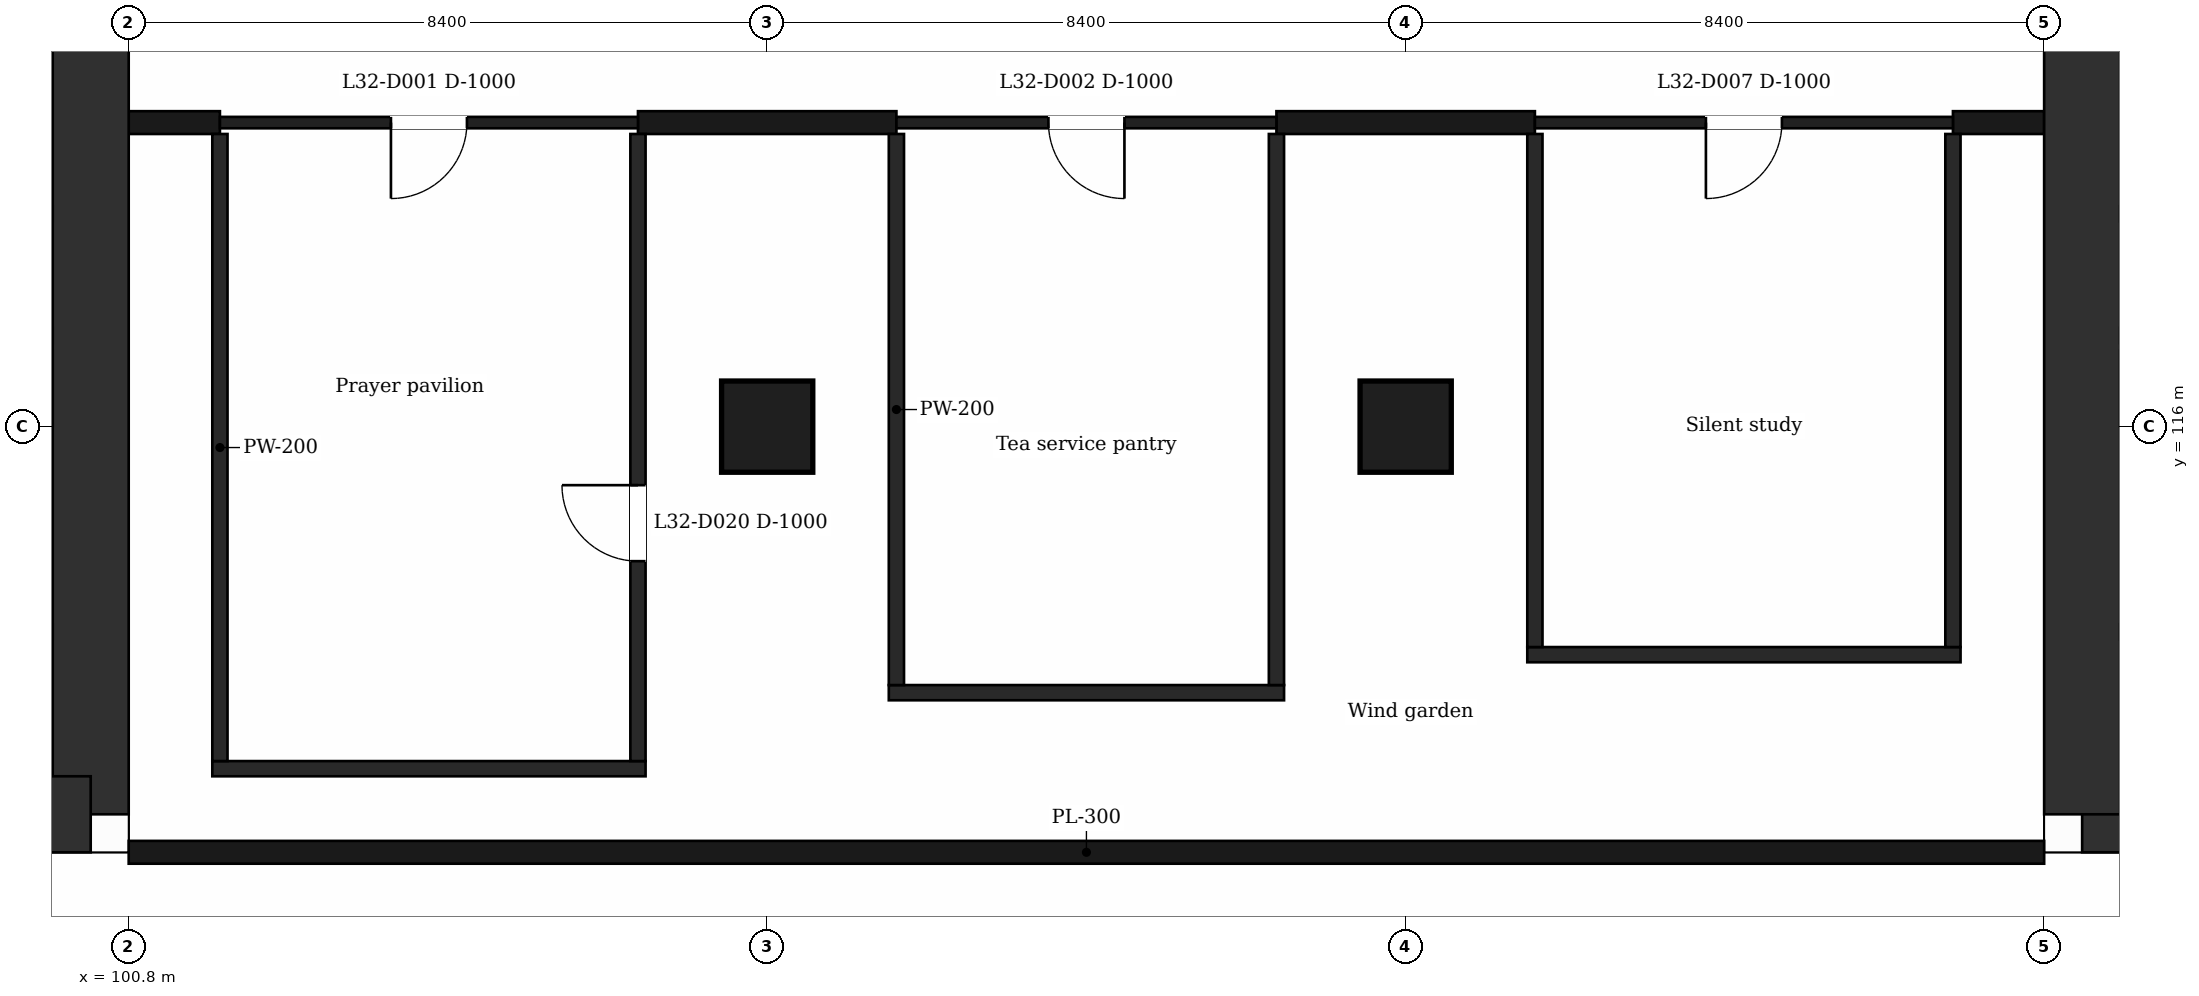
"""IFC4 building model, lengths in metres.
Left out: names, types, materials, properties, quantities, classifications, styles, units other than length and angle.
Written with IfcOpenShell. Run it as: python <this file> out.ifc"""

import sys

from ifc_helpers import new_model, si_unit, direction, frame, frame_2d, origin, origin_2d, place, context, subcontext, project, spatial, rectangle, extrude, element, fill, save


model = new_model("IFC4")
c1 = context("Model", 3, precision=1e-05, world=origin(), true_north=direction((0.0, 1.0)))
c2 = subcontext(c1, "Body", "Model", "MODEL_VIEW")
j1 = project(units=[si_unit("LENGTHUNIT", "METRE"), si_unit("PLANEANGLEUNIT", "RADIAN")], contexts=[c1])
p1 = place(None, origin())
s1 = spatial("IfcSite", under=j1, at=p1, CompositionType="ELEMENT")
p2 = place(p1, origin())
s2 = spatial("IfcBuilding", under=s1, at=p2, CompositionType="ELEMENT")
p3 = place(p2, frame((0.0, 0.0, 135.4)))
s3 = spatial("IfcBuildingStorey", under=s2, at=p3, CompositionType="ELEMENT", Elevation=135.4)
p4 = place(p3, frame((100.3, 131.9, 0.0), z_axis=(0.0, 0.0, 1.0), x_axis=(0.0, -1.0, 0.0)))
e1 = element("IfcWall", 1, at=p4, inside=s3, PredefinedType="SHEAR", context=c2, shape_type="SweptSolid", body=[
    extrude(rectangle(XDim=21.0, YDim=1.0, at=frame_2d((10.5, 0.0))), origin(), (0.0, 0.0, 1.0), 7.4),
])
p5 = place(p4, frame((7.75, 0.0, 0.0)))
e2 = element("IfcOpeningElement", 2, at=p5, cuts=e1, PredefinedType="OPENING", context=c2, shape_type="SweptSolid", body=[
    extrude(rectangle(XDim=1.4, YDim=2.1, at=frame_2d((0.7, 1.05))), frame((0.0, 0.51, 0.0), z_axis=(0.0, -1.0, 0.0), x_axis=(1.0, 0.0, 0.0)), (0.0, 0.0, 1.0), 1.02),
])
p6 = place(p3, frame((100.3, 110.9, 0.0), z_axis=(0.0, 0.0, 1.0), x_axis=(-1.0, 0.0, 0.0)))
e3 = element("IfcWall", 3, at=p6, inside=s3, PredefinedType="SHEAR", context=c2, shape_type="SweptSolid", body=[
    extrude(rectangle(XDim=14.059, YDim=1.0, at=frame_2d((7.03, 0.0))), origin(), (0.0, 0.0, 1.0), 7.4),
])
p7 = place(p6, frame((5.802, 0.0, 0.0)))
e4 = element("IfcOpeningElement", 4, at=p7, cuts=e3, PredefinedType="OPENING", context=c2, shape_type="SweptSolid", body=[
    extrude(rectangle(XDim=1.4, YDim=2.1, at=frame_2d((0.7, 1.05))), frame((0.0, 0.51, 0.0), z_axis=(0.0, -1.0, 0.0), x_axis=(1.0, 0.0, 0.0)), (0.0, 0.0, 1.0), 1.02),
])
p8 = place(p3, frame((94.9, 116.5, 0.0), z_axis=(0.0, 0.0, 1.0), x_axis=(1.0, 0.0, 0.0)))
e5 = element("IfcWall", 5, at=p8, inside=s3, PredefinedType="SHEAR", context=c2, shape_type="SweptSolid", body=[
    extrude(rectangle(XDim=4.9, YDim=1.0, at=frame_2d((2.45, 0.0))), origin(), (0.0, 0.0, 1.0), 7.4),
])
p9 = place(p3, frame((140.559, 110.9, 0.0), z_axis=(0.0, 0.0, 1.0), x_axis=(-1.0, 0.0, 0.0)))
e6 = element("IfcWall", 6, at=p9, inside=s3, PredefinedType="SHEAR", context=c2, shape_type="SweptSolid", body=[
    extrude(rectangle(XDim=14.059, YDim=1.0, at=frame_2d((7.029, 0.0))), origin(), (0.0, 0.0, 1.0), 7.4),
])
p10 = place(p9, frame((6.858, 0.0, 0.0)))
e7 = element("IfcOpeningElement", 7, at=p10, cuts=e6, PredefinedType="OPENING", context=c2, shape_type="SweptSolid", body=[
    extrude(rectangle(XDim=1.4, YDim=2.1, at=frame_2d((0.7, 1.05))), frame((0.0, 0.51, 0.0), z_axis=(0.0, -1.0, 0.0), x_axis=(1.0, 0.0, 0.0)), (0.0, 0.0, 1.0), 1.02),
])
p11 = place(p3, frame((126.5, 110.9, 0.0), z_axis=(0.0, 0.0, 1.0), x_axis=(0.0, 1.0, 0.0)))
e8 = element("IfcWall", 8, at=p11, inside=s3, PredefinedType="SHEAR", context=c2, shape_type="SweptSolid", body=[
    extrude(rectangle(XDim=21.0, YDim=1.0, at=frame_2d((10.5, 0.0))), origin(), (0.0, 0.0, 1.0), 7.4),
])
p12 = place(p11, frame((11.85, 0.0, 0.0)))
e9 = element("IfcOpeningElement", 9, at=p12, cuts=e8, PredefinedType="OPENING", context=c2, shape_type="SweptSolid", body=[
    extrude(rectangle(XDim=1.4, YDim=2.1, at=frame_2d((0.7, 1.05))), frame((0.0, 0.51, 0.0), z_axis=(0.0, -1.0, 0.0), x_axis=(1.0, 0.0, 0.0)), (0.0, 0.0, 1.0), 1.02),
])
for number, where, z_axis, x_axis in (
    (10, (109.2, 116.0, 0.0), (0.0, 0.0, 1.0), (1.0, 0.0, 0.0)),
    (11, (117.6, 116.0, 0.0), (0.0, 0.0, 1.0), (1.0, 0.0, 0.0)),
):
    element("IfcColumn", number, at=place(p3, frame(where, z_axis=z_axis, x_axis=x_axis)), inside=s3, PredefinedType="COLUMN", context=c2, shape_type="SweptSolid", body=[
        extrude(rectangle(XDim=1.2, YDim=1.2, at=origin_2d()), origin(), (0.0, 0.0, 1.0), 7.4),
    ])
p13 = place(p3, frame((100.8, 110.4, 0.0), z_axis=(0.0, 0.0, 1.0), x_axis=(1.0, 0.0, 0.0)))
e12 = element("IfcWall", 12, at=p13, inside=s3, PredefinedType="PARTITIONING", context=c2, shape_type="SweptSolid", body=[
    extrude(rectangle(XDim=25.2, YDim=0.3, at=frame_2d((12.6, 0.0))), origin(), (0.0, 0.0, 1.0), 1.0),
])
p14 = place(p3, frame((101.9, 111.5, 0.0), z_axis=(0.0, 0.0, 1.0), x_axis=(1.0, 0.0, 0.0)))
e13 = element("IfcWall", 13, at=p14, inside=s3, PredefinedType="PARTITIONING", context=c2, shape_type="SweptSolid", body=[
    extrude(rectangle(XDim=5.7, YDim=0.2, at=frame_2d((2.85, 0.0))), origin(), (0.0, 0.0, 1.0), 6.9),
])
p15 = place(p3, frame((110.8, 112.5, 0.0), z_axis=(0.0, 0.0, 1.0), x_axis=(1.0, 0.0, 0.0)))
e14 = element("IfcWall", 14, at=p15, inside=s3, PredefinedType="PARTITIONING", context=c2, shape_type="SweptSolid", body=[
    extrude(rectangle(XDim=5.2, YDim=0.2, at=frame_2d((2.6, 0.0))), origin(), (0.0, 0.0, 1.0), 6.9),
])
p16 = place(p3, frame((119.2, 113.0, 0.0), z_axis=(0.0, 0.0, 1.0), x_axis=(1.0, 0.0, 0.0)))
e15 = element("IfcWall", 15, at=p16, inside=s3, PredefinedType="PARTITIONING", context=c2, shape_type="SweptSolid", body=[
    extrude(rectangle(XDim=5.7, YDim=0.2, at=frame_2d((2.85, 0.0))), origin(), (0.0, 0.0, 1.0), 6.9),
])
p17 = place(p3, frame((127.0, 113.3, 0.0), z_axis=(0.0, 0.0, 1.0), x_axis=(1.0, 0.0, 0.0)))
e16 = element("IfcWall", 16, at=p17, inside=s3, PredefinedType="PARTITIONING", context=c2, shape_type="SweptSolid", body=[
    extrude(rectangle(XDim=4.673, YDim=0.2, at=frame_2d((2.336, 0.0))), origin(), (0.0, 0.0, 1.0), 6.9),
])
p18 = place(p17, frame((0.545, 0.0, 0.0)))
e17 = element("IfcOpeningElement", 17, at=p18, cuts=e16, PredefinedType="OPENING", context=c2, shape_type="SweptSolid", body=[
    extrude(rectangle(XDim=1.1, YDim=2.1, at=frame_2d((0.55, 1.05))), frame((0.0, 0.11, 0.0), z_axis=(0.0, -1.0, 0.0), x_axis=(1.0, 0.0, 0.0)), (0.0, 0.0, 1.0), 0.22),
])
for number, where, z_axis, x_axis in (
    (18, (95.227, 117.2, 0.0), (0.0, 0.0, 1.0), (1.0, 0.0, 0.0)),
    (19, (95.227, 118.8, 0.0), (0.0, 0.0, 1.0), (1.0, 0.0, 0.0)),
):
    element("IfcWall", number, at=place(p3, frame(where, z_axis=z_axis, x_axis=x_axis)), inside=s3, PredefinedType="PARTITIONING", context=c2, shape_type="SweptSolid", body=[
        extrude(rectangle(XDim=4.573, YDim=0.2, at=frame_2d((2.287, 0.0))), origin(), (0.0, 0.0, 1.0), 6.9),
    ])
p19 = place(p3, frame((100.8, 120.0, 0.0), z_axis=(0.0, 0.0, 1.0), x_axis=(1.0, 0.0, 0.0)))
e20 = element("IfcWall", 20, at=p19, inside=s3, PredefinedType="PARTITIONING", context=c2, shape_type="SweptSolid", body=[
    extrude(rectangle(XDim=1.2, YDim=0.3, at=frame_2d((0.6, 0.0))), origin(), (0.0, 0.0, 1.0), 1.0),
])
p20 = place(p3, frame((107.5, 120.0, 0.0), z_axis=(0.0, 0.0, 1.0), x_axis=(1.0, 0.0, 0.0)))
e21 = element("IfcWall", 21, at=p20, inside=s3, PredefinedType="PARTITIONING", context=c2, shape_type="SweptSolid", body=[
    extrude(rectangle(XDim=3.4, YDim=0.3, at=frame_2d((1.7, 0.0))), origin(), (0.0, 0.0, 1.0), 1.0),
])
p21 = place(p3, frame((115.9, 120.0, 0.0), z_axis=(0.0, 0.0, 1.0), x_axis=(1.0, 0.0, 0.0)))
e22 = element("IfcWall", 22, at=p21, inside=s3, PredefinedType="PARTITIONING", context=c2, shape_type="SweptSolid", body=[
    extrude(rectangle(XDim=3.4, YDim=0.3, at=frame_2d((1.7, 0.0))), origin(), (0.0, 0.0, 1.0), 1.0),
])
p22 = place(p3, frame((124.8, 120.0, 0.0), z_axis=(0.0, 0.0, 1.0), x_axis=(1.0, 0.0, 0.0)))
e23 = element("IfcWall", 23, at=p22, inside=s3, PredefinedType="PARTITIONING", context=c2, shape_type="SweptSolid", body=[
    extrude(rectangle(XDim=1.2, YDim=0.3, at=frame_2d((0.6, 0.0))), origin(), (0.0, 0.0, 1.0), 1.0),
])
p23 = place(p3, frame((102.0, 120.0, 0.0), z_axis=(0.0, 0.0, 1.0), x_axis=(1.0, 0.0, 0.0)))
e24 = element("IfcWall", 24, at=p23, inside=s3, PredefinedType="PARTITIONING", context=c2, shape_type="SweptSolid", body=[
    extrude(rectangle(XDim=5.5, YDim=0.15, at=frame_2d((2.75, 0.0))), origin(), (0.0, 0.0, 1.0), 6.9),
])
p24 = place(p23, frame((2.25, 0.0, 0.0)))
e25 = element("IfcOpeningElement", 25, at=p24, cuts=e24, PredefinedType="OPENING", context=c2, shape_type="SweptSolid", body=[
    extrude(rectangle(XDim=1.0, YDim=2.1, at=frame_2d((0.5, 1.05))), frame((0.0, 0.085, 0.0), z_axis=(0.0, -1.0, 0.0), x_axis=(1.0, 0.0, 0.0)), (0.0, 0.0, 1.0), 0.17),
])
p25 = place(p3, frame((110.9, 120.0, 0.0), z_axis=(0.0, 0.0, 1.0), x_axis=(1.0, 0.0, 0.0)))
e26 = element("IfcWall", 26, at=p25, inside=s3, PredefinedType="PARTITIONING", context=c2, shape_type="SweptSolid", body=[
    extrude(rectangle(XDim=5.0, YDim=0.15, at=frame_2d((2.5, 0.0))), origin(), (0.0, 0.0, 1.0), 6.9),
])
p26 = place(p25, frame((2.0, 0.0, 0.0)))
e27 = element("IfcOpeningElement", 27, at=p26, cuts=e26, PredefinedType="OPENING", context=c2, shape_type="SweptSolid", body=[
    extrude(rectangle(XDim=1.0, YDim=2.1, at=frame_2d((0.5, 1.05))), frame((0.0, 0.085, 0.0), z_axis=(0.0, -1.0, 0.0), x_axis=(1.0, 0.0, 0.0)), (0.0, 0.0, 1.0), 0.17),
])
p27 = place(p3, frame((119.3, 120.0, 0.0), z_axis=(0.0, 0.0, 1.0), x_axis=(1.0, 0.0, 0.0)))
e28 = element("IfcWall", 28, at=p27, inside=s3, PredefinedType="PARTITIONING", context=c2, shape_type="SweptSolid", body=[
    extrude(rectangle(XDim=5.5, YDim=0.15, at=frame_2d((2.75, 0.0))), origin(), (0.0, 0.0, 1.0), 6.9),
])
p28 = place(p27, frame((2.25, 0.0, 0.0)))
e29 = element("IfcOpeningElement", 29, at=p28, cuts=e28, PredefinedType="OPENING", context=c2, shape_type="SweptSolid", body=[
    extrude(rectangle(XDim=1.0, YDim=2.1, at=frame_2d((0.5, 1.05))), frame((0.0, 0.085, 0.0), z_axis=(0.0, -1.0, 0.0), x_axis=(1.0, 0.0, 0.0)), (0.0, 0.0, 1.0), 0.17),
])
p29 = place(p3, frame((102.0, 111.6, 0.0), z_axis=(0.0, 0.0, 1.0), x_axis=(0.0, 1.0, 0.0)))
e30 = element("IfcWall", 30, at=p29, inside=s3, PredefinedType="PARTITIONING", context=c2, shape_type="SweptSolid", body=[
    extrude(rectangle(XDim=8.25, YDim=0.2, at=frame_2d((4.125, 0.0))), origin(), (0.0, 0.0, 1.0), 6.9),
])
p30 = place(p3, frame((107.5, 111.6, 0.0), z_axis=(0.0, 0.0, 1.0), x_axis=(0.0, 1.0, 0.0)))
e31 = element("IfcWall", 31, at=p30, inside=s3, PredefinedType="PARTITIONING", context=c2, shape_type="SweptSolid", body=[
    extrude(rectangle(XDim=8.25, YDim=0.2, at=frame_2d((4.125, 0.0))), origin(), (0.0, 0.0, 1.0), 6.9),
])
p31 = place(p30, frame((2.63, 0.0, 0.0)))
e32 = element("IfcOpeningElement", 32, at=p31, cuts=e31, PredefinedType="OPENING", context=c2, shape_type="SweptSolid", body=[
    extrude(rectangle(XDim=1.0, YDim=2.1, at=frame_2d((0.5, 1.05))), frame((0.0, 0.11, 0.0), z_axis=(0.0, -1.0, 0.0), x_axis=(1.0, 0.0, 0.0)), (0.0, 0.0, 1.0), 0.22),
])
for number, where, z_axis, x_axis in (
    (33, (110.9, 112.6, 0.0), (0.0, 0.0, 1.0), (0.0, 1.0, 0.0)),
    (34, (115.9, 112.6, 0.0), (0.0, 0.0, 1.0), (0.0, 1.0, 0.0)),
):
    element("IfcWall", number, at=place(p3, frame(where, z_axis=z_axis, x_axis=x_axis)), inside=s3, PredefinedType="PARTITIONING", context=c2, shape_type="SweptSolid", body=[
        extrude(rectangle(XDim=7.25, YDim=0.2, at=frame_2d((3.625, 0.0))), origin(), (0.0, 0.0, 1.0), 6.9),
    ])
for number, where, z_axis, x_axis in (
    (35, (119.3, 113.1, 0.0), (0.0, 0.0, 1.0), (0.0, 1.0, 0.0)),
    (36, (124.8, 113.1, 0.0), (0.0, 0.0, 1.0), (0.0, 1.0, 0.0)),
):
    element("IfcWall", number, at=place(p3, frame(where, z_axis=z_axis, x_axis=x_axis)), inside=s3, PredefinedType="PARTITIONING", context=c2, shape_type="SweptSolid", body=[
        extrude(rectangle(XDim=6.75, YDim=0.2, at=frame_2d((3.375, 0.0))), origin(), (0.0, 0.0, 1.0), 6.9),
    ])
p32 = place(p24, origin())
e37 = element("IfcDoor", 37, at=p32, inside=s3, OperationType="SINGLE_SWING_LEFT", PredefinedType="DOOR", context=c2, shape_type="SweptSolid", body=[
    extrude(rectangle(XDim=1.0, YDim=2.1, at=frame_2d((0.5, 1.05))), frame((0.0, 0.025, 0.0), z_axis=(0.0, -1.0, 0.0), x_axis=(1.0, 0.0, 0.0)), (0.0, 0.0, 1.0), 0.05),
])
fill(e25, e37)
p33 = place(p26, origin())
e38 = element("IfcDoor", 38, at=p33, inside=s3, OperationType="SINGLE_SWING_RIGHT", PredefinedType="DOOR", context=c2, shape_type="SweptSolid", body=[
    extrude(rectangle(XDim=1.0, YDim=2.1, at=frame_2d((0.5, 1.05))), frame((0.0, 0.025, 0.0), z_axis=(0.0, -1.0, 0.0), x_axis=(1.0, 0.0, 0.0)), (0.0, 0.0, 1.0), 0.05),
])
fill(e27, e38)
p34 = place(p28, origin())
e39 = element("IfcDoor", 39, at=p34, inside=s3, OperationType="SINGLE_SWING_LEFT", PredefinedType="DOOR", context=c2, shape_type="SweptSolid", body=[
    extrude(rectangle(XDim=1.0, YDim=2.1, at=frame_2d((0.5, 1.05))), frame((0.0, 0.025, 0.0), z_axis=(0.0, -1.0, 0.0), x_axis=(1.0, 0.0, 0.0)), (0.0, 0.0, 1.0), 0.05),
])
fill(e29, e39)
p35 = place(p31, origin())
e40 = element("IfcDoor", 40, at=p35, inside=s3, OperationType="SINGLE_SWING_RIGHT", PredefinedType="DOOR", context=c2, shape_type="SweptSolid", body=[
    extrude(rectangle(XDim=1.0, YDim=2.1, at=frame_2d((0.5, 1.05))), frame((0.0, 0.025, 0.0), z_axis=(0.0, -1.0, 0.0), x_axis=(1.0, 0.0, 0.0)), (0.0, 0.0, 1.0), 0.05),
])
fill(e32, e40)
save(model, sys.argv[1])
